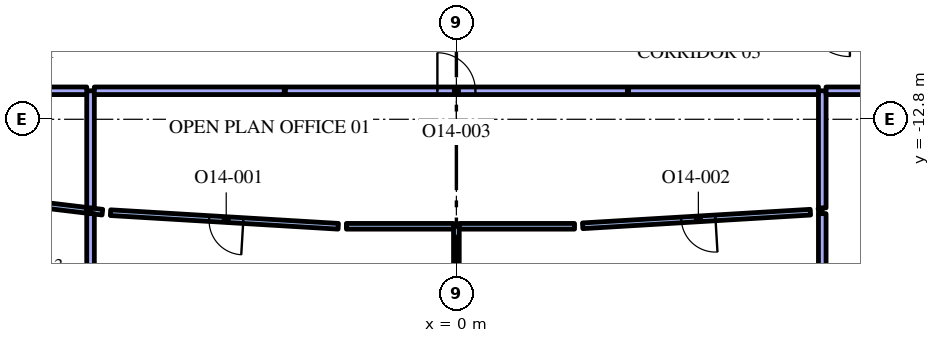
"""IFC4 building model, lengths in metres.
Left out: names, types, materials, properties, quantities, classifications, styles, units other than length and angle.
Written with IfcOpenShell. Run it as: python <this file> out.ifc"""

import sys

from ifc_helpers import new_model, si_unit, direction, frame, frame_2d, origin, place, context, subcontext, project, spatial, rectangle, extrude, element, fill, save


model = new_model("IFC4")
c1 = context("Model", 3, precision=1e-05, world=origin(), true_north=direction((0.0, 1.0)))
c2 = subcontext(c1, "Body", "Model", "MODEL_VIEW")
j1 = project(units=[si_unit("LENGTHUNIT", "METRE"), si_unit("PLANEANGLEUNIT", "RADIAN")], contexts=[c1])
p1 = place(None, origin())
s1 = spatial("IfcSite", under=j1, at=p1, CompositionType="ELEMENT")
p2 = place(p1, origin())
s2 = spatial("IfcBuilding", under=s1, at=p2, CompositionType="ELEMENT")
p3 = place(p2, frame((0.0, 0.0, 309.0)))
s3 = spatial("IfcBuildingStorey", under=s2, at=p3, CompositionType="ELEMENT", Elevation=309.0)
p4 = place(p3, frame((0.0, -15.615, 0.0), z_axis=(0.0, 0.0, 1.0), x_axis=(0.0, -1.0, 0.0)))
e1 = element("IfcWall", 1, at=p4, inside=s3, PredefinedType="PARTITIONING", context=c2, shape_type="SweptSolid", body=[
    extrude(rectangle(XDim=3.2, YDim=0.15, at=frame_2d((1.6, 0.0))), origin(), (0.0, 0.0, 1.0), 3.55),
])
p5 = place(p3, frame((-9.627, -15.207, 0.0), z_axis=(0.0, 0.0, 1.0), x_axis=(0.992909886905, -0.118869493503, 0.0)))
e2 = element("IfcWall", 2, at=p5, inside=s3, PredefinedType="PARTITIONING", context=c2, shape_type="SweptSolid", body=[
    extrude(rectangle(XDim=0.314, YDim=0.15, at=frame_2d((0.157, 0.0))), origin(), (0.0, 0.0, 1.0), 3.55),
])
p6 = place(p3, frame((-3.109, -15.615, 0.0), z_axis=(0.0, 0.0, 1.0), x_axis=(-0.998221243398, 0.059618363188, 0.0)))
e3 = element("IfcWall", 3, at=p6, inside=s3, PredefinedType="PARTITIONING", context=c2, shape_type="SweptSolid", body=[
    extrude(rectangle(XDim=6.003, YDim=0.15, at=frame_2d((3.002, 0.0))), origin(), (0.0, 0.0, 1.0), 3.55),
])
p7 = place(p6, frame((2.503, 0.0, 0.0)))
e4 = element("IfcOpeningElement", 4, at=p7, cuts=e3, PredefinedType="OPENING", context=c2, shape_type="SweptSolid", body=[
    extrude(rectangle(XDim=0.9, YDim=2.1, at=frame_2d((0.45, 1.05))), frame((0.0, 0.085, 0.0), z_axis=(0.0, -1.0, 0.0), x_axis=(1.0, 0.0, 0.0)), (0.0, 0.0, 1.0), 0.17),
])
p8 = place(p3, frame((-2.895, -15.615, 0.0), z_axis=(0.0, 0.0, 1.0), x_axis=(1.0, 0.0, 0.0)))
e5 = element("IfcWall", 5, at=p8, inside=s3, PredefinedType="PARTITIONING", context=c2, shape_type="SweptSolid", body=[
    extrude(rectangle(XDim=2.82, YDim=0.15, at=frame_2d((1.41, 0.0))), origin(), (0.0, 0.0, 1.0), 3.55),
])
p9 = place(p3, frame((-9.627, -17.919, 0.0), z_axis=(0.0, 0.0, 1.0), x_axis=(0.0, 1.0, 0.0)))
e6 = element("IfcWall", 6, at=p9, inside=s3, PredefinedType="PARTITIONING", context=c2, shape_type="SweptSolid", body=[
    extrude(rectangle(XDim=2.636, YDim=0.2, at=frame_2d((1.318, 0.0))), origin(), (0.0, 0.0, 1.0), 3.55),
])
p10 = place(p3, frame((0.075, -15.615, 0.0), z_axis=(0.0, 0.0, 1.0), x_axis=(1.0, 0.0, 0.0)))
e7 = element("IfcWall", 7, at=p10, inside=s3, PredefinedType="PARTITIONING", context=c2, shape_type="SweptSolid", body=[
    extrude(rectangle(XDim=3.034, YDim=0.15, at=frame_2d((1.517, 0.0))), origin(), (0.0, 0.0, 1.0), 3.55),
])
p11 = place(p3, frame((9.315, -15.244, 0.0), z_axis=(0.0, 0.0, 1.0), x_axis=(-0.998218822372, -0.059658885864, 0.0)))
e8 = element("IfcWall", 8, at=p11, inside=s3, PredefinedType="PARTITIONING", context=c2, shape_type="SweptSolid", body=[
    extrude(rectangle(XDim=6.003, YDim=0.15, at=frame_2d((3.002, 0.0))), origin(), (0.0, 0.0, 1.0), 3.55),
])
p12 = place(p11, frame((2.503, 0.0, 0.0)))
e9 = element("IfcOpeningElement", 9, at=p12, cuts=e8, PredefinedType="OPENING", context=c2, shape_type="SweptSolid", body=[
    extrude(rectangle(XDim=0.9, YDim=2.1, at=frame_2d((0.45, 1.05))), frame((0.0, 0.085, 0.0), z_axis=(0.0, -1.0, 0.0), x_axis=(1.0, 0.0, 0.0)), (0.0, 0.0, 1.0), 0.17),
])
p13 = place(p3, frame((9.528, -15.219, 0.0), z_axis=(0.0, 0.0, 1.0), x_axis=(0.992830592569, 0.119529973061, 0.0)))
e10 = element("IfcWall", 10, at=p13, inside=s3, PredefinedType="PARTITIONING", context=c2, shape_type="SweptSolid", body=[
    extrude(rectangle(XDim=0.1, YDim=0.15, at=frame_2d((0.05, 0.0))), origin(), (0.0, 0.0, 1.0), 3.55),
])
p14 = place(p3, frame((9.627, -15.283, 0.0), z_axis=(0.0, 0.0, 1.0), x_axis=(0.0, -1.0, 0.0)))
e11 = element("IfcWall", 11, at=p14, inside=s3, PredefinedType="PARTITIONING", context=c2, shape_type="SweptSolid", body=[
    extrude(rectangle(XDim=2.636, YDim=0.2, at=frame_2d((1.318, 0.0))), origin(), (0.0, 0.0, 1.0), 3.55),
])
for number, where, z_axis, x_axis in (
    (12, (9.627, -12.05, 0.0), (0.0, 0.0, 1.0), (0.0, -1.0, 0.0)),
    (13, (-9.627, -15.132, 0.0), (0.0, 0.0, 1.0), (0.0, 1.0, 0.0)),
):
    element("IfcWall", number, at=place(p3, frame(where, z_axis=z_axis, x_axis=x_axis)), inside=s3, PredefinedType="PARTITIONING", context=c2, shape_type="SweptSolid", body=[
        extrude(rectangle(XDim=3.082, YDim=0.2, at=frame_2d((1.541, 0.0))), origin(), (0.0, 0.0, 1.0), 3.55),
    ])
p15 = place(p3, frame((-4.5, -12.05, 0.0), z_axis=(0.0, 0.0, 1.0), x_axis=(1.0, 0.0, 0.0)))
e14 = element("IfcWall", 14, at=p15, inside=s3, PredefinedType="PARTITIONING", context=c2, shape_type="SweptSolid", body=[
    extrude(rectangle(XDim=9.0, YDim=0.2, at=frame_2d((4.5, 0.0))), origin(), (0.0, 0.0, 1.0), 3.55),
])
p16 = place(p15, frame((4.0, 0.0, 0.0)))
e15 = element("IfcOpeningElement", 15, at=p16, cuts=e14, PredefinedType="OPENING", context=c2, shape_type="SweptSolid", body=[
    extrude(rectangle(XDim=1.0, YDim=2.1, at=frame_2d((0.5, 1.05))), frame((0.0, 0.11, 0.0), z_axis=(0.0, -1.0, 0.0), x_axis=(1.0, 0.0, 0.0)), (0.0, 0.0, 1.0), 0.22),
])
for number, where, z_axis, x_axis in (
    (16, (-9.527, -12.05, 0.0), (0.0, 0.0, 1.0), (1.0, 0.0, 0.0)),
    (17, (4.53, -12.05, 0.0), (0.0, 0.0, 1.0), (1.0, 0.0, 0.0)),
):
    element("IfcWall", number, at=place(p3, frame(where, z_axis=z_axis, x_axis=x_axis)), inside=s3, PredefinedType="PARTITIONING", context=c2, shape_type="SweptSolid", body=[
        extrude(rectangle(XDim=4.997, YDim=0.2, at=frame_2d((2.499, 0.0))), origin(), (0.0, 0.0, 1.0), 3.55),
    ])
p17 = place(p3, frame((9.727, -12.05, 0.0), z_axis=(0.0, 0.0, 1.0), x_axis=(1.0, 0.0, 0.0)))
e18 = element("IfcWall", 18, at=p17, inside=s3, PredefinedType="PARTITIONING", context=c2, shape_type="SweptSolid", body=[
    extrude(rectangle(XDim=4.562, YDim=0.2, at=frame_2d((2.281, 0.0))), origin(), (0.0, 0.0, 1.0), 3.55),
])
p18 = place(p17, frame((1.8, 0.0, 0.0)))
e19 = element("IfcOpeningElement", 19, at=p18, cuts=e18, PredefinedType="OPENING", context=c2, shape_type="SweptSolid", body=[
    extrude(rectangle(XDim=1.0, YDim=2.1, at=frame_2d((0.5, 1.05))), frame((0.0, 0.11, 0.0), z_axis=(0.0, -1.0, 0.0), x_axis=(1.0, 0.0, 0.0)), (0.0, 0.0, 1.0), 0.22),
])
p19 = place(p3, frame((-9.727, -15.195, 0.0), z_axis=(0.0, 0.0, 1.0), x_axis=(-0.992892587246, 0.119013907556, 0.0)))
e20 = element("IfcWall", 20, at=p19, inside=s3, PredefinedType="PARTITIONING", context=c2, shape_type="SweptSolid", body=[
    extrude(rectangle(XDim=5.059, YDim=0.15, at=frame_2d((2.529, 0.0))), origin(), (0.0, 0.0, 1.0), 3.55),
])
p20 = place(p19, frame((2.059, 0.0, 0.0)))
e21 = element("IfcOpeningElement", 21, at=p20, cuts=e20, PredefinedType="OPENING", context=c2, shape_type="SweptSolid", body=[
    extrude(rectangle(XDim=0.9, YDim=2.1, at=frame_2d((0.45, 1.05))), frame((0.0, 0.085, 0.0), z_axis=(0.0, -1.0, 0.0), x_axis=(1.0, 0.0, 0.0)), (0.0, 0.0, 1.0), 0.17),
])
p21 = place(p3, frame((-14.26, -12.05, 0.0), z_axis=(0.0, 0.0, 1.0), x_axis=(1.0, 0.0, 0.0)))
e22 = element("IfcWall", 22, at=p21, inside=s3, PredefinedType="PARTITIONING", context=c2, shape_type="SweptSolid", body=[
    extrude(rectangle(XDim=4.532, YDim=0.2, at=frame_2d((2.266, 0.0))), origin(), (0.0, 0.0, 1.0), 3.55),
])
p22 = place(p7, origin())
e23 = element("IfcDoor", 23, at=p22, inside=s3, OperationType="SINGLE_SWING_LEFT", PredefinedType="DOOR", context=c2, shape_type="SweptSolid", body=[
    extrude(rectangle(XDim=0.9, YDim=2.1, at=frame_2d((0.45, 1.05))), frame((0.0, 0.025, 0.0), z_axis=(0.0, -1.0, 0.0), x_axis=(1.0, 0.0, 0.0)), (0.0, 0.0, 1.0), 0.05),
])
fill(e4, e23)
p23 = place(p12, origin())
e24 = element("IfcDoor", 24, at=p23, inside=s3, OperationType="SINGLE_SWING_LEFT", PredefinedType="DOOR", context=c2, shape_type="SweptSolid", body=[
    extrude(rectangle(XDim=0.9, YDim=2.1, at=frame_2d((0.45, 1.05))), frame((0.0, 0.025, 0.0), z_axis=(0.0, -1.0, 0.0), x_axis=(1.0, 0.0, 0.0)), (0.0, 0.0, 1.0), 0.05),
])
fill(e9, e24)
p24 = place(p16, origin())
e25 = element("IfcDoor", 25, at=p24, inside=s3, OperationType="SINGLE_SWING_RIGHT", PredefinedType="DOOR", context=c2, shape_type="SweptSolid", body=[
    extrude(rectangle(XDim=1.0, YDim=2.1, at=frame_2d((0.5, 1.05))), frame((0.0, 0.025, 0.0), z_axis=(0.0, -1.0, 0.0), x_axis=(1.0, 0.0, 0.0)), (0.0, 0.0, 1.0), 0.05),
])
fill(e15, e25)
save(model, sys.argv[1])
